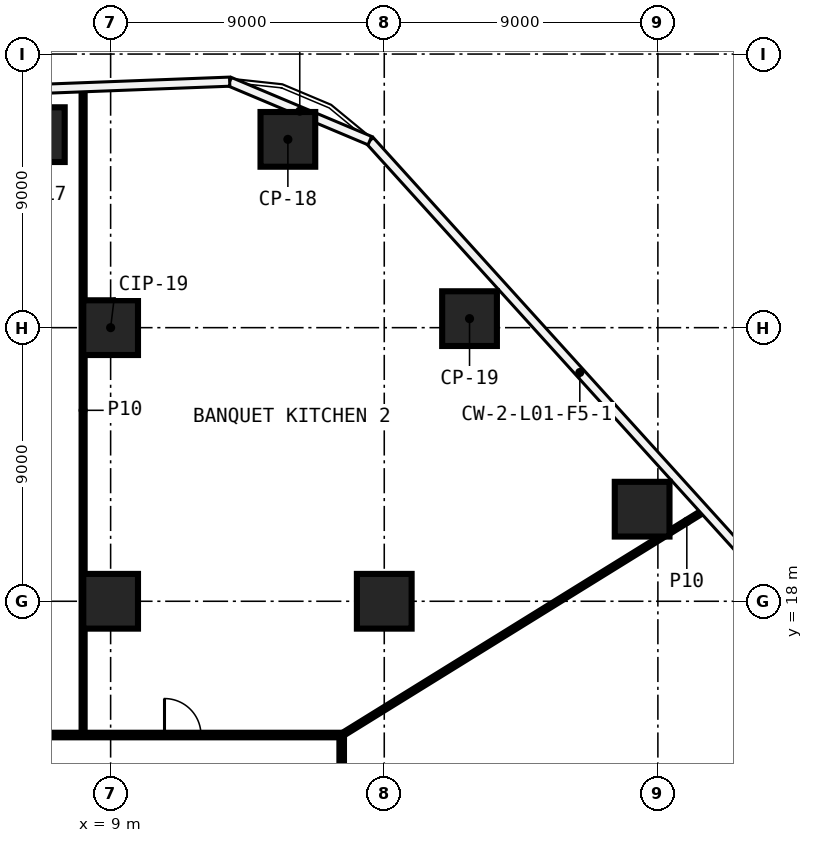
"""IFC4 building model, lengths in metres.
Left out: names, types, materials, properties, quantities, classifications, styles, units other than length and angle.
Written with IfcOpenShell. Run it as: python <this file> out.ifc"""

import sys

from ifc_helpers import new_model, si_unit, direction, frame, frame_2d, origin, origin_2d, place, context, subcontext, project, spatial, rectangle, extrude, element, fill, save


model = new_model("IFC4")
c1 = context("Model", 3, precision=1e-05, world=origin(), true_north=direction((0.0, 1.0)))
c2 = subcontext(c1, "Body", "Model", "MODEL_VIEW")
j1 = project(units=[si_unit("LENGTHUNIT", "METRE"), si_unit("PLANEANGLEUNIT", "RADIAN")], contexts=[c1])
p1 = place(None, origin())
s1 = spatial("IfcSite", under=j1, at=p1, CompositionType="ELEMENT")
p2 = place(p1, origin())
s2 = spatial("IfcBuilding", under=s1, at=p2, CompositionType="ELEMENT")
p3 = place(p2, frame((0.0, 0.0, 9.0)))
s3 = spatial("IfcBuildingStorey", under=s2, at=p3, CompositionType="ELEMENT", Elevation=9.0)
for number, where, z_axis, x_axis in (
    (1, (6.589, 33.349, 0.0), (0.0, 0.0, 1.0), (1.0, 0.0, 0.0)),
    (2, (14.83, 33.194, 0.0), (0.0, 0.0, 1.0), (1.0, 0.0, 0.0)),
    (3, (20.805, 27.297, 0.0), (0.0, 0.0, 1.0), (1.0, 0.0, 0.0)),
    (4, (26.482, 21.029, 0.0), (0.0, 0.0, 1.0), (1.0, 0.0, 0.0)),
    (5, (9.0, 18.0, 0.0), (0.0, 0.0, 1.0), (1.0, 0.0, 0.0)),
    (6, (9.0, 27.0, 0.0), (0.0, 0.0, 1.0), (1.0, 0.0, 0.0)),
    (7, (18.0, 18.0, 0.0), (0.0, 0.0, 1.0), (1.0, 0.0, 0.0)),
):
    element("IfcColumn", number, at=place(p3, frame(where, z_axis=z_axis, x_axis=x_axis)), inside=s3, PredefinedType="COLUMN", context=c2, shape_type="SweptSolid", body=[
        extrude(rectangle(XDim=1.8, YDim=1.8, at=origin_2d()), origin(), (0.0, 0.0, 1.0), 9.55),
    ])
p4 = place(p3, frame((-16.675, 13.6, 0.0), z_axis=(0.0, 0.0, 1.0), x_axis=(1.0, 0.0, 0.0)))
e8 = element("IfcWall", 8, at=p4, inside=s3, PredefinedType="PARTITIONING", context=c2, shape_type="SweptSolid", body=[
    extrude(rectangle(XDim=33.35, YDim=0.15, at=frame_2d((16.675, 0.0))), origin(), (0.0, 0.0, 1.0), 9.55),
])
p5 = place(p4, frame((27.447, 0.0, 0.0)))
e9 = element("IfcOpeningElement", 9, at=p5, cuts=e8, PredefinedType="OPENING", context=c2, shape_type="SweptSolid", body=[
    extrude(rectangle(XDim=1.2, YDim=2.1, at=frame_2d((0.6, 1.05))), frame((0.0, 0.085, 0.0), z_axis=(0.0, -1.0, 0.0), x_axis=(1.0, 0.0, 0.0)), (0.0, 0.0, 1.0), 0.17),
])
p6 = place(p4, frame((19.346, 0.0, 0.0)))
e10 = element("IfcOpeningElement", 10, at=p6, cuts=e8, PredefinedType="OPENING", context=c2, shape_type="SweptSolid", body=[
    extrude(rectangle(XDim=1.2, YDim=2.1, at=frame_2d((0.6, 1.05))), frame((0.0, 0.085, 0.0), z_axis=(0.0, -1.0, 0.0), x_axis=(1.0, 0.0, 0.0)), (0.0, 0.0, 1.0), 0.17),
])
p7 = place(p3, frame((16.6, 13.6, 0.0), z_axis=(0.0, 0.0, 1.0), x_axis=(0.850261790898, 0.526360035469, 0.0)))
e11 = element("IfcWall", 11, at=p7, inside=s3, PredefinedType="PARTITIONING", context=c2, shape_type="SweptSolid", body=[
    extrude(rectangle(XDim=12.404, YDim=0.1, at=frame_2d((6.202, 0.0))), origin(), (0.0, 0.0, 1.0), 9.55),
])
p8 = place(p3, frame((27.382, 20.275, 0.0), z_axis=(0.0, 0.0, 1.0), x_axis=(0.850241855485, 0.526392237008, 0.0)))
e12 = element("IfcWall", 12, at=p8, inside=s3, PredefinedType="PARTITIONING", context=c2, shape_type="SweptSolid", body=[
    extrude(rectangle(XDim=1.34, YDim=0.1, at=frame_2d((0.67, 0.0))), origin(), (0.0, 0.0, 1.0), 9.55),
])
p9 = place(p3, frame((16.6, 13.525, 0.0), z_axis=(0.0, 0.0, 1.0), x_axis=(0.0, -1.0, 0.0)))
e13 = element("IfcWall", 13, at=p9, inside=s3, PredefinedType="PARTITIONING", context=c2, shape_type="SweptSolid", body=[
    extrude(rectangle(XDim=27.05, YDim=0.15, at=frame_2d((13.525, 0.0))), origin(), (0.0, 0.0, 1.0), 9.55),
])
p10 = place(p9, frame((17.482, 0.0, 0.0)))
e14 = element("IfcOpeningElement", 14, at=p10, cuts=e13, PredefinedType="OPENING", context=c2, shape_type="SweptSolid", body=[
    extrude(rectangle(XDim=1.2, YDim=2.1, at=frame_2d((0.6, 1.05))), frame((0.0, 0.085, 0.0), z_axis=(0.0, -1.0, 0.0), x_axis=(1.0, 0.0, 0.0)), (0.0, 0.0, 1.0), 0.17),
])
p11 = place(p3, frame((8.095, 13.675, 0.0), z_axis=(0.0, 0.0, 1.0), x_axis=(0.0, 1.0, 0.0)))
e15 = element("IfcWall", 15, at=p11, inside=s3, PredefinedType="PARTITIONING", context=c2, shape_type="SweptSolid", body=[
    extrude(rectangle(XDim=21.213, YDim=0.1, at=frame_2d((10.606, 0.0))), origin(), (0.0, 0.0, 1.0), 9.55),
])
p12 = place(p2, origin())
s4 = spatial("IfcBuildingStorey", under=s2, at=p12, CompositionType="ELEMENT", Elevation=0.0)
p13 = place(p12, frame((22.339, 36.05, -0.3), z_axis=(0.0, 0.0, 1.0), x_axis=(1.0, 0.0, 0.0)))
e16 = element("IfcColumn", 16, at=p13, inside=s4, PredefinedType="COLUMN", context=c2, shape_type="SweptSolid", body=[
    extrude(rectangle(XDim=1.0, YDim=1.0, at=origin_2d()), origin(), (0.0, 0.0, 1.0), 18.85),
])
p14 = place(p5, origin())
e17 = element("IfcDoor", 17, at=p14, inside=s3, OperationType="SINGLE_SWING_RIGHT", PredefinedType="DOOR", context=c2, shape_type="SweptSolid", body=[
    extrude(rectangle(XDim=1.2, YDim=2.1, at=frame_2d((0.6, 1.05))), frame((0.0, 0.025, 0.0), z_axis=(0.0, -1.0, 0.0), x_axis=(1.0, 0.0, 0.0)), (0.0, 0.0, 1.0), 0.05),
])
fill(e9, e17)
save(model, sys.argv[1])
